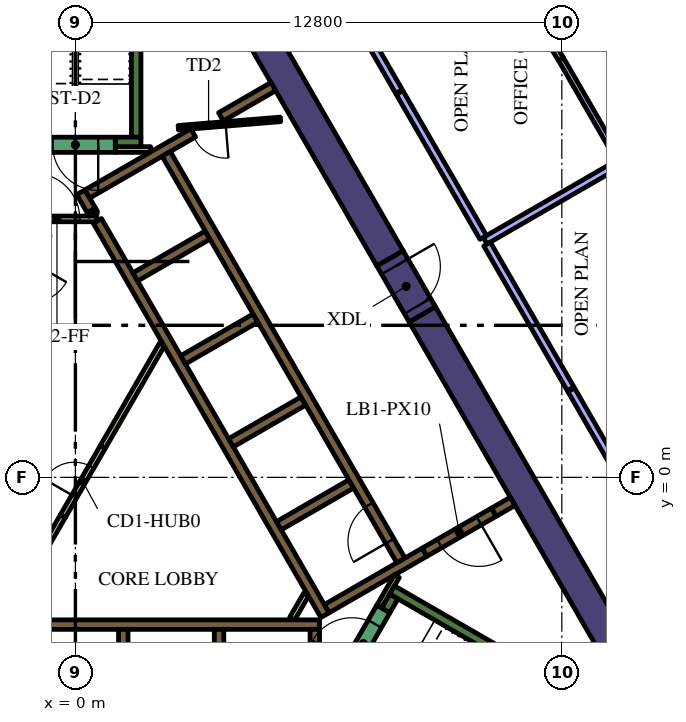
"""IFC4 building model, lengths in metres.
Left out: names, types, materials, properties, quantities, classifications, styles, units other than length and angle.
Written with IfcOpenShell. Run it as: python <this file> out.ifc"""

import sys

from ifc_helpers import new_model, si_unit, direction, frame, frame_2d, origin, place, context, subcontext, project, spatial, rectangle, extrude, element, fill, save


model = new_model("IFC4")
c1 = context("Model", 3, precision=1e-05, world=origin(), true_north=direction((0.0, 1.0)))
c2 = subcontext(c1, "Body", "Model", "MODEL_VIEW")
j1 = project(units=[si_unit("LENGTHUNIT", "METRE"), si_unit("PLANEANGLEUNIT", "RADIAN")], contexts=[c1])
p1 = place(None, origin())
s1 = spatial("IfcSite", under=j1, at=p1, CompositionType="ELEMENT")
p2 = place(p1, origin())
s2 = spatial("IfcBuilding", under=s1, at=p2, CompositionType="ELEMENT")
p3 = place(p2, frame((0.0, 0.0, 154.2)))
s3 = spatial("IfcBuildingStorey", under=s2, at=p3, CompositionType="ELEMENT", Elevation=154.2)
p4 = place(p3, frame((9.129, 4.289, 0.0), z_axis=(0.0, 0.0, 1.0), x_axis=(0.499995742806, -0.866027861663, 0.0)))
e1 = element("IfcWall", 1, at=p4, inside=s3, PredefinedType="SOLIDWALL", context=c2, shape_type="SweptSolid", body=[
    extrude(rectangle(XDim=12.527, YDim=0.8, at=frame_2d((6.264, 0.0))), origin(), (0.0, 0.0, 1.0), 4.2),
])
p5 = place(p3, frame((8.279, 5.761, 0.0), z_axis=(0.0, 0.0, 1.0), x_axis=(-0.500010359015, 0.866019422922, 0.0)))
e2 = element("IfcWall", 2, at=p5, inside=s3, PredefinedType="SOLIDWALL", context=c2, shape_type="SweptSolid", body=[
    extrude(rectangle(XDim=12.528, YDim=0.8, at=frame_2d((6.264, 0.0))), origin(), (0.0, 0.0, 1.0), 4.2),
])
p6 = place(p3, frame((8.334, -2.964, 0.0), z_axis=(0.0, 0.0, 1.0), x_axis=(0.866016039709, -0.500016218704, 0.0)))
e3 = element("IfcWall", 3, at=p6, inside=s3, PredefinedType="SOLIDWALL", context=c2, shape_type="SweptSolid", body=[
    extrude(rectangle(XDim=7.05, YDim=0.25, at=frame_2d((3.525, 0.0))), origin(), (0.0, 0.0, 1.0), 4.2),
])
p7 = place(p3, frame((8.168, -3.503, 0.0), z_axis=(0.0, 0.0, 1.0), x_axis=(0.49972245349, 0.866185586049, 0.0)))
e4 = element("IfcWall", 4, at=p7, inside=s3, PredefinedType="SOLIDWALL", context=c2, shape_type="SweptSolid", body=[
    extrude(rectangle(XDim=0.425, YDim=0.25, at=frame_2d((0.212, 0.0))), origin(), (0.0, 0.0, 1.0), 4.2),
])
p8 = place(p3, frame((1.6, 8.95, 0.0), z_axis=(0.0, 0.0, 1.0), x_axis=(0.0, 1.0, 0.0)))
e5 = element("IfcWall", 5, at=p8, inside=s3, PredefinedType="SOLIDWALL", context=c2, shape_type="SweptSolid", body=[
    extrude(rectangle(XDim=6.8, YDim=0.25, at=frame_2d((3.4, 0.0))), origin(), (0.0, 0.0, 1.0), 4.2),
])
p9 = place(p3, frame((1.05, 8.825, 0.0), z_axis=(0.0, 0.0, 1.0), x_axis=(1.0, 0.0, 0.0)))
e6 = element("IfcWall", 6, at=p9, inside=s3, PredefinedType="SOLIDWALL", context=c2, shape_type="SweptSolid", body=[
    extrude(rectangle(XDim=0.675, YDim=0.25, at=frame_2d((0.337, 0.0))), origin(), (0.0, 0.0, 1.0), 4.2),
])
p10 = place(p3, frame((-5.545, -3.875, 0.0), z_axis=(0.0, 0.0, 1.0), x_axis=(1.0, 0.0, 0.0)))
e7 = element("IfcWall", 7, at=p10, inside=s3, PredefinedType="SOLIDWALL", context=c2, shape_type="SweptSolid", body=[
    extrude(rectangle(XDim=11.97, YDim=0.25, at=frame_2d((5.985, 0.0))), origin(), (0.0, 0.0, 1.0), 4.2),
])
p11 = place(p3, frame((6.3, -7.24, 0.0), z_axis=(0.0, 0.0, 1.0), x_axis=(0.0, 1.0, 0.0)))
e8 = element("IfcWall", 8, at=p11, inside=s3, PredefinedType="SOLIDWALL", context=c2, shape_type="SweptSolid", body=[
    extrude(rectangle(XDim=3.24, YDim=0.25, at=frame_2d((1.62, 0.0))), origin(), (0.0, 0.0, 1.0), 4.2),
])
for number, where, z_axis, x_axis in (
    (9, (3.78, -4.0, 0.0), (0.0, 0.0, 1.0), (0.0, -1.0, 0.0)),
    (10, (1.26, -4.0, 0.0), (0.0, 0.0, 1.0), (0.0, -1.0, 0.0)),
):
    element("IfcWall", number, at=place(p3, frame(where, z_axis=z_axis, x_axis=x_axis)), inside=s3, PredefinedType="SOLIDWALL", context=c2, shape_type="SweptSolid", body=[
        extrude(rectangle(XDim=2.2, YDim=0.25, at=frame_2d((1.1, 0.0))), origin(), (0.0, 0.0, 1.0), 4.2),
    ])
p12 = place(p3, frame((11.507, -0.631, 0.0), z_axis=(0.0, 0.0, 1.0), x_axis=(-0.866093731455, -0.499881634324, 0.0)))
e11 = element("IfcWall", 11, at=p12, inside=s3, PredefinedType="SOLIDWALL", context=c2, shape_type="SweptSolid", body=[
    extrude(rectangle(XDim=0.575, YDim=0.25, at=frame_2d((0.288, 0.0))), origin(), (0.0, 0.0, 1.0), 4.2),
])
p13 = place(p3, frame((0.473, 6.93, 0.0), z_axis=(0.0, 0.0, 1.0), x_axis=(-0.49972245349, 0.866185586049, 0.0)))
e12 = element("IfcWall", 12, at=p13, inside=s3, PredefinedType="SOLIDWALL", context=c2, shape_type="SweptSolid", body=[
    extrude(rectangle(XDim=0.11, YDim=0.25, at=frame_2d((0.055, 0.0))), origin(), (0.0, 0.0, 1.0), 4.2),
])
p14 = place(p3, frame((6.568, -3.627, 0.0), z_axis=(0.0, 0.0, 1.0), x_axis=(-0.499999455981, 0.866025717874, 0.0)))
e13 = element("IfcWall", 13, at=p14, inside=s3, PredefinedType="SOLIDWALL", context=c2, shape_type="SweptSolid", body=[
    extrude(rectangle(XDim=11.978, YDim=0.25, at=frame_2d((5.989, 0.0))), origin(), (0.0, 0.0, 1.0), 4.2),
])
p15 = place(p3, frame((0.417, 7.027, 0.0), z_axis=(0.0, 0.0, 1.0), x_axis=(-0.500210807569, 0.865903659763, 0.0)))
e14 = element("IfcWall", 14, at=p15, inside=s3, PredefinedType="SOLIDWALL", context=c2, shape_type="SweptSolid", body=[
    extrude(rectangle(XDim=0.548, YDim=0.25, at=frame_2d((0.274, 0.0))), origin(), (0.0, 0.0, 1.0), 4.2),
])
p16 = place(p3, frame((3.1, 9.064, 0.0), z_axis=(0.0, 0.0, 1.0), x_axis=(-0.866030133475, -0.499991807846, 0.0)))
e15 = element("IfcWall", 15, at=p16, inside=s3, PredefinedType="SOLIDWALL", context=c2, shape_type="SweptSolid", body=[
    extrude(rectangle(XDim=3.217, YDim=0.25, at=frame_2d((1.608, 0.0))), origin(), (0.0, 0.0, 1.0), 4.2),
])
p17 = place(p3, frame((1.574, 5.274, 0.0), z_axis=(0.0, 0.0, 1.0), x_axis=(0.866028486751, 0.499994660107, 0.0)))
e16 = element("IfcWall", 16, at=p17, inside=s3, PredefinedType="SOLIDWALL", context=c2, shape_type="SweptSolid", body=[
    extrude(rectangle(XDim=2.2, YDim=0.25, at=frame_2d((1.1, 0.0))), origin(), (0.0, 0.0, 1.0), 4.2),
])
for number, where, z_axis, x_axis in (
    (17, (2.834, 3.091, 0.0), (0.0, 0.0, 1.0), (0.866, 0.5, 0.0)),
    (18, (4.094, 0.909, 0.0), (0.0, 0.0, 1.0), (0.866, 0.5, 0.0)),
    (19, (5.354, -1.274, 0.0), (0.0, 0.0, 1.0), (0.866, 0.5, 0.0)),
):
    element("IfcWall", number, at=place(p3, frame(where, z_axis=z_axis, x_axis=x_axis)), inside=s3, PredefinedType="SOLIDWALL", context=c2, shape_type="SweptSolid", body=[
        extrude(rectangle(XDim=2.2, YDim=0.25, at=frame_2d((1.1, 0.0))), origin(), (0.0, 0.0, 1.0), 4.2),
    ])
p18 = place(p3, frame((6.614, -3.456, 0.0), z_axis=(0.0, 0.0, 1.0), x_axis=(0.866032512851, 0.499987686533, 0.0)))
e20 = element("IfcWall", 20, at=p18, inside=s3, PredefinedType="SOLIDWALL", context=c2, shape_type="SweptSolid", body=[
    extrude(rectangle(XDim=2.975, YDim=0.25, at=frame_2d((1.487, 0.0))), origin(), (0.0, 0.0, 1.0), 4.2),
])
p19 = place(p3, frame((3.83, 9.486, 0.0), z_axis=(0.0, 0.0, 1.0), x_axis=(0.865986202621, 0.500067892261, 0.0)))
e21 = element("IfcWall", 21, at=p19, inside=s3, PredefinedType="SOLIDWALL", context=c2, shape_type="SweptSolid", body=[
    extrude(rectangle(XDim=1.591, YDim=0.25, at=frame_2d((0.795, 0.0))), origin(), (0.0, 0.0, 1.0), 4.2),
])
p20 = place(p3, frame((1.05, 8.625, 0.0), z_axis=(0.0, 0.0, 1.0), x_axis=(1.0, 0.0, 0.0)))
e22 = element("IfcWall", 22, at=p20, inside=s3, PredefinedType="PARTITIONING", context=c2, shape_type="SweptSolid", body=[
    extrude(rectangle(XDim=0.929, YDim=0.15, at=frame_2d((0.464, 0.0))), origin(), (0.0, 0.0, 1.0), 3.15),
])
p21 = place(p3, frame((8.459, -2.599, 0.0), z_axis=(0.0, 0.0, 1.0), x_axis=(-0.500041054325, -0.866001699761, 0.0)))
e23 = element("IfcWall", 23, at=p21, inside=s3, PredefinedType="PARTITIONING", context=c2, shape_type="SweptSolid", body=[
    extrude(rectangle(XDim=0.929, YDim=0.15, at=frame_2d((0.464, 0.0))), origin(), (0.0, 0.0, 1.0), 4.2),
])
p22 = place(p3, frame((5.705, -3.718, 0.0), z_axis=(0.0, 0.0, 1.0), x_axis=(0.499962090823, 0.866047289552, 0.0)))
e24 = element("IfcWall", 24, at=p22, inside=s3, PredefinedType="PARTITIONING", context=c2, shape_type="SweptSolid", body=[
    extrude(rectangle(XDim=0.735, YDim=0.15, at=frame_2d((0.367, 0.0))), origin(), (0.0, 0.0, 1.0), 3.15),
])
p23 = place(p3, frame((-1.887, -3.718, 0.0), z_axis=(0.0, 0.0, 1.0), x_axis=(0.500043732237, 0.866000153493, 0.0)))
e25 = element("IfcWall", 25, at=p23, inside=s3, PredefinedType="PARTITIONING", context=c2, shape_type="SweptSolid", body=[
    extrude(rectangle(XDim=3.114, YDim=0.15, at=frame_2d((1.557, 0.0))), origin(), (0.0, 0.0, 1.0), 3.15),
])
p24 = place(p3, frame((0.72, 0.797, 0.0), z_axis=(0.0, 0.0, 1.0), x_axis=(0.499984921984, 0.866034108906, 0.0)))
e26 = element("IfcWall", 26, at=p24, inside=s3, PredefinedType="PARTITIONING", context=c2, shape_type="SweptSolid", body=[
    extrude(rectangle(XDim=3.113, YDim=0.15, at=frame_2d((1.557, 0.0))), origin(), (0.0, 0.0, 1.0), 3.15),
])
p25 = place(p3, frame((8.565, -2.185, 0.0), z_axis=(0.0, 0.0, 1.0), x_axis=(-0.499997954832, 0.866026584559, 0.0)))
e27 = element("IfcWall", 27, at=p25, inside=s3, PredefinedType="SOLIDWALL", context=c2, shape_type="SweptSolid", body=[
    extrude(rectangle(XDim=12.35, YDim=0.25, at=frame_2d((6.175, 0.0))), origin(), (0.0, 0.0, 1.0), 4.2),
])
p26 = place(p25, frame((0.585, 0.0, 0.0)))
e28 = element("IfcOpeningElement", 28, at=p26, cuts=e27, PredefinedType="OPENING", context=c2, shape_type="SweptSolid", body=[
    extrude(rectangle(XDim=1.1, YDim=2.1, at=frame_2d((0.55, 1.05))), frame((0.0, 0.135, 0.0), z_axis=(0.0, -1.0, 0.0), x_axis=(1.0, 0.0, 0.0)), (0.0, 0.0, 1.0), 0.27),
])
p27 = place(p3, frame((7.053, -5.284, 0.0), z_axis=(0.0, 0.0, 1.0), x_axis=(0.500078061341, 0.865980330357, 0.0)))
e29 = element("IfcWall", 29, at=p27, inside=s3, PredefinedType="SOLIDWALL", context=c2, shape_type="SweptSolid", body=[
    extrude(rectangle(XDim=2.1, YDim=0.4, at=frame_2d((1.05, 0.0))), origin(), (0.0, 0.0, 1.0), 4.2),
])
p28 = place(p27, frame((0.45, 0.0, 0.0)))
e30 = element("IfcOpeningElement", 30, at=p28, cuts=e29, PredefinedType="OPENING", context=c2, shape_type="SweptSolid", body=[
    extrude(rectangle(XDim=1.2, YDim=2.1, at=frame_2d((0.6, 1.05))), frame((0.0, 0.21, 0.0), z_axis=(0.0, -1.0, 0.0), x_axis=(1.0, 0.0, 0.0)), (0.0, 0.0, 1.0), 0.42),
])
p29 = place(p3, frame((1.05, 8.75, 0.0), z_axis=(0.0, 0.0, 1.0), x_axis=(-1.0, 0.0, 0.0)))
e31 = element("IfcWall", 31, at=p29, inside=s3, PredefinedType="SOLIDWALL", context=c2, shape_type="SweptSolid", body=[
    extrude(rectangle(XDim=2.1, YDim=0.4, at=frame_2d((1.05, 0.0))), origin(), (0.0, 0.0, 1.0), 4.2),
])
p30 = place(p29, frame((0.45, 0.0, 0.0)))
e32 = element("IfcOpeningElement", 32, at=p30, cuts=e31, PredefinedType="OPENING", context=c2, shape_type="SweptSolid", body=[
    extrude(rectangle(XDim=1.2, YDim=2.1, at=frame_2d((0.6, 1.05))), frame((0.0, 0.21, 0.0), z_axis=(0.0, -1.0, 0.0), x_axis=(1.0, 0.0, 0.0)), (0.0, 0.0, 1.0), 0.42),
])
p31 = place(p3, frame((5.398, 9.419, 0.0), z_axis=(0.0, 0.0, 1.0), x_axis=(-0.996653416376, -0.081743303248, 0.0)))
e33 = element("IfcWall", 33, at=p31, inside=s3, PredefinedType="PARTITIONING", context=c2, shape_type="SweptSolid", body=[
    extrude(rectangle(XDim=2.7, YDim=0.12, at=frame_2d((1.35, 0.0))), origin(), (0.0, 0.0, 1.0), 3.15),
])
p32 = place(p31, frame((1.45, 0.0, 0.0)))
e34 = element("IfcOpeningElement", 34, at=p32, cuts=e33, PredefinedType="OPENING", context=c2, shape_type="SweptSolid", body=[
    extrude(rectangle(XDim=0.9, YDim=2.1, at=frame_2d((0.45, 1.05))), frame((0.0, 0.07, 0.0), z_axis=(0.0, -1.0, 0.0), x_axis=(1.0, 0.0, 0.0)), (0.0, 0.0, 1.0), 0.14),
])
p33 = place(p3, frame((-0.33, -1.022, 0.0), z_axis=(0.0, 0.0, 1.0), x_axis=(0.500027713859, 0.866009402589, 0.0)))
e35 = element("IfcWall", 35, at=p33, inside=s3, PredefinedType="PARTITIONING", context=c2, shape_type="SweptSolid", body=[
    extrude(rectangle(XDim=2.1, YDim=0.15, at=frame_2d((1.05, 0.0))), origin(), (0.0, 0.0, 1.0), 3.15),
])
p34 = place(p33, frame((0.6, 0.0, 0.0)))
e36 = element("IfcOpeningElement", 36, at=p34, cuts=e35, PredefinedType="OPENING", context=c2, shape_type="SweptSolid", body=[
    extrude(rectangle(XDim=0.9, YDim=2.1, at=frame_2d((0.45, 1.05))), frame((0.0, 0.085, 0.0), z_axis=(0.0, -1.0, 0.0), x_axis=(1.0, 0.0, 0.0)), (0.0, 0.0, 1.0), 0.17),
])
p35 = place(p3, frame((-1.534, 6.8, 0.0), z_axis=(0.0, 0.0, 1.0), x_axis=(1.0, 0.0, 0.0)))
e37 = element("IfcWall", 37, at=p35, inside=s3, PredefinedType="PARTITIONING", context=c2, shape_type="SweptSolid", body=[
    extrude(rectangle(XDim=2.1, YDim=0.15, at=frame_2d((1.05, 0.0))), origin(), (0.0, 0.0, 1.0), 3.15),
])
p36 = place(p35, frame((0.45, 0.0, 0.0)))
e38 = element("IfcOpeningElement", 38, at=p36, cuts=e37, PredefinedType="OPENING", context=c2, shape_type="SweptSolid", body=[
    extrude(rectangle(XDim=1.2, YDim=2.1, at=frame_2d((0.6, 1.05))), frame((0.0, 0.085, 0.0), z_axis=(0.0, -1.0, 0.0), x_axis=(1.0, 0.0, 0.0)), (0.0, 0.0, 1.0), 0.17),
])
p37 = place(p3, frame((11.009, -0.919, 0.0), z_axis=(0.0, 0.0, 1.0), x_axis=(-0.866059744384, -0.49994051562, 0.0)))
e39 = element("IfcWall", 39, at=p37, inside=s3, PredefinedType="SOLIDWALL", context=c2, shape_type="SweptSolid", body=[
    extrude(rectangle(XDim=2.1, YDim=0.25, at=frame_2d((1.05, 0.0))), origin(), (0.0, 0.0, 1.0), 4.2),
])
p38 = place(p37, frame((0.45, 0.0, 0.0)))
e40 = element("IfcOpeningElement", 40, at=p38, cuts=e39, PredefinedType="OPENING", context=c2, shape_type="SweptSolid", body=[
    extrude(rectangle(XDim=1.2, YDim=2.1, at=frame_2d((0.6, 1.05))), frame((0.0, 0.135, 0.0), z_axis=(0.0, -1.0, 0.0), x_axis=(1.0, 0.0, 0.0)), (0.0, 0.0, 1.0), 0.27),
])
p39 = place(p3, frame((8.279, 5.761, 0.0), z_axis=(0.0, 0.0, 1.0), x_axis=(0.500062241894, -0.865989465428, 0.0)))
e41 = element("IfcWall", 41, at=p39, inside=s3, PredefinedType="SOLIDWALL", context=c2, shape_type="SweptSolid", body=[
    extrude(rectangle(XDim=1.7, YDim=0.8, at=frame_2d((0.85, 0.0))), origin(), (0.0, 0.0, 1.0), 4.2),
])
p40 = place(p39, frame((0.25, 0.0, 0.0)))
e42 = element("IfcOpeningElement", 42, at=p40, cuts=e41, PredefinedType="OPENING", context=c2, shape_type="SweptSolid", body=[
    extrude(rectangle(XDim=1.2, YDim=2.1, at=frame_2d((0.6, 1.05))), frame((0.0, 0.41, 0.0), z_axis=(0.0, -1.0, 0.0), x_axis=(1.0, 0.0, 0.0)), (0.0, 0.0, 1.0), 0.82),
])
p41 = place(p3, frame((10.782, 6.225, 0.0), z_axis=(0.0, 0.0, 1.0), x_axis=(0.866034752867, 0.499983806564, 0.0)))
e43 = element("IfcWall", 43, at=p41, inside=s3, PredefinedType="PARTITIONING", context=c2, shape_type="SweptSolid", body=[
    extrude(rectangle(XDim=4.043, YDim=0.2, at=frame_2d((2.021, 0.0))), origin(), (0.0, 0.0, 1.0), 3.15),
])
p42 = place(p3, frame((13.032, 2.328, 0.0), z_axis=(0.0, 0.0, 1.0), x_axis=(-0.499988222896, 0.866032203192, 0.0)))
e44 = element("IfcWall", 44, at=p42, inside=s3, PredefinedType="PARTITIONING", context=c2, shape_type="SweptSolid", body=[
    extrude(rectangle(XDim=4.4, YDim=0.2, at=frame_2d((2.2, 0.0))), origin(), (0.0, 0.0, 1.0), 3.15),
])
p43 = place(p3, frame((18.042, -6.35, 0.0), z_axis=(0.0, 0.0, 1.0), x_axis=(-0.499986873641, 0.866032982159, 0.0)))
e45 = element("IfcWall", 45, at=p43, inside=s3, PredefinedType="PARTITIONING", context=c2, shape_type="SweptSolid", body=[
    extrude(rectangle(XDim=9.99, YDim=0.2, at=frame_2d((4.995, 0.0))), origin(), (0.0, 0.0, 1.0), 3.15),
])
p44 = place(p43, frame((4.5, 0.0, 0.0)))
e46 = element("IfcOpeningElement", 46, at=p44, cuts=e45, PredefinedType="OPENING", context=c2, shape_type="SweptSolid", body=[
    extrude(rectangle(XDim=1.0, YDim=2.1, at=frame_2d((0.5, 1.05))), frame((0.0, 0.11, 0.0), z_axis=(0.0, -1.0, 0.0), x_axis=(1.0, 0.0, 0.0)), (0.0, 0.0, 1.0), 0.22),
])
p45 = place(p3, frame((14.299, 8.371, 0.0), z_axis=(0.0, 0.0, 1.0), x_axis=(-0.500019211527, 0.86601431172, 0.0)))
e47 = element("IfcWall", 47, at=p45, inside=s3, PredefinedType="PARTITIONING", context=c2, shape_type="SweptSolid", body=[
    extrude(rectangle(XDim=3.039, YDim=0.15, at=frame_2d((1.519, 0.0))), origin(), (0.0, 0.0, 1.0), 3.15),
])
p46 = place(p3, frame((9.403, 16.447, 0.0), z_axis=(0.0, 0.0, 1.0), x_axis=(0.527026092571, -0.849849102929, 0.0)))
e48 = element("IfcWall", 48, at=p46, inside=s3, PredefinedType="PARTITIONING", context=c2, shape_type="SweptSolid", body=[
    extrude(rectangle(XDim=6.407, YDim=0.15, at=frame_2d((3.204, 0.0))), origin(), (0.0, 0.0, 1.0), 3.15),
])
p47 = place(p46, frame((2.707, 0.0, 0.0)))
e49 = element("IfcOpeningElement", 49, at=p47, cuts=e48, PredefinedType="OPENING", context=c2, shape_type="SweptSolid", body=[
    extrude(rectangle(XDim=0.9, YDim=2.1, at=frame_2d((0.45, 1.05))), frame((0.0, 0.085, 0.0), z_axis=(0.0, -1.0, 0.0), x_axis=(1.0, 0.0, 0.0)), (0.0, 0.0, 1.0), 0.17),
])
p48 = place(p3, frame((10.732, 6.312, 0.0), z_axis=(0.0, 0.0, 1.0), x_axis=(-0.499984786451, 0.866034187153, 0.0)))
e50 = element("IfcWall", 50, at=p48, inside=s3, PredefinedType="PARTITIONING", context=c2, shape_type="SweptSolid", body=[
    extrude(rectangle(XDim=4.404, YDim=0.2, at=frame_2d((2.202, 0.0))), origin(), (0.0, 0.0, 1.0), 3.15),
])
p49 = place(p3, frame((8.515, 10.152, 0.0), z_axis=(0.0, 0.0, 1.0), x_axis=(-0.499998974385, 0.866025995923, 0.0)))
e51 = element("IfcWall", 51, at=p49, inside=s3, PredefinedType="PARTITIONING", context=c2, shape_type="SweptSolid", body=[
    extrude(rectangle(XDim=9.986, YDim=0.2, at=frame_2d((4.993, 0.0))), origin(), (0.0, 0.0, 1.0), 3.15),
])
p50 = place(p49, frame((4.5, 0.0, 0.0)))
e52 = element("IfcOpeningElement", 52, at=p50, cuts=e51, PredefinedType="OPENING", context=c2, shape_type="SweptSolid", body=[
    extrude(rectangle(XDim=1.0, YDim=2.1, at=frame_2d((0.5, 1.05))), frame((0.0, 0.11, 0.0), z_axis=(0.0, -1.0, 0.0), x_axis=(1.0, 0.0, 0.0)), (0.0, 0.0, 1.0), 0.22),
])
p51 = place(p26, origin())
e53 = element("IfcDoor", 53, at=p51, inside=s3, OperationType="DOUBLE_DOOR_SLIDING", PredefinedType="DOOR", context=c2, shape_type="SweptSolid", body=[
    extrude(rectangle(XDim=1.1, YDim=2.1, at=frame_2d((0.55, 1.05))), frame((0.0, 0.025, 0.0), z_axis=(0.0, -1.0, 0.0), x_axis=(1.0, 0.0, 0.0)), (0.0, 0.0, 1.0), 0.05),
])
fill(e28, e53)
p52 = place(p28, origin())
e54 = element("IfcDoor", 54, at=p52, inside=s3, OperationType="SINGLE_SWING_LEFT", PredefinedType="DOOR", context=c2, shape_type="SweptSolid", body=[
    extrude(rectangle(XDim=1.2, YDim=2.1, at=frame_2d((0.6, 1.05))), frame((0.0, 0.025, 0.0), z_axis=(0.0, -1.0, 0.0), x_axis=(1.0, 0.0, 0.0)), (0.0, 0.0, 1.0), 0.05),
])
fill(e30, e54)
p53 = place(p30, origin())
e55 = element("IfcDoor", 55, at=p53, inside=s3, OperationType="SINGLE_SWING_LEFT", PredefinedType="DOOR", context=c2, shape_type="SweptSolid", body=[
    extrude(rectangle(XDim=1.2, YDim=2.1, at=frame_2d((0.6, 1.05))), frame((0.0, 0.025, 0.0), z_axis=(0.0, -1.0, 0.0), x_axis=(1.0, 0.0, 0.0)), (0.0, 0.0, 1.0), 0.05),
])
fill(e32, e55)
p54 = place(p32, origin())
e56 = element("IfcDoor", 56, at=p54, inside=s3, OperationType="SINGLE_SWING_LEFT", PredefinedType="DOOR", context=c2, shape_type="SweptSolid", body=[
    extrude(rectangle(XDim=0.9, YDim=2.1, at=frame_2d((0.45, 1.05))), frame((0.0, 0.025, 0.0), z_axis=(0.0, -1.0, 0.0), x_axis=(1.0, 0.0, 0.0)), (0.0, 0.0, 1.0), 0.05),
])
fill(e34, e56)
p55 = place(p34, origin())
e57 = element("IfcDoor", 57, at=p55, inside=s3, OperationType="SINGLE_SWING_LEFT", PredefinedType="DOOR", context=c2, shape_type="SweptSolid", body=[
    extrude(rectangle(XDim=0.9, YDim=2.1, at=frame_2d((0.45, 1.05))), frame((0.0, 0.025, 0.0), z_axis=(0.0, -1.0, 0.0), x_axis=(1.0, 0.0, 0.0)), (0.0, 0.0, 1.0), 0.05),
])
fill(e36, e57)
p56 = place(p36, origin())
e58 = element("IfcDoor", 58, at=p56, inside=s3, OperationType="SINGLE_SWING_LEFT", PredefinedType="DOOR", context=c2, shape_type="SweptSolid", body=[
    extrude(rectangle(XDim=1.2, YDim=2.1, at=frame_2d((0.6, 1.05))), frame((0.0, 0.025, 0.0), z_axis=(0.0, -1.0, 0.0), x_axis=(1.0, 0.0, 0.0)), (0.0, 0.0, 1.0), 0.05),
])
fill(e38, e58)
p57 = place(p38, origin())
e59 = element("IfcDoor", 59, at=p57, inside=s3, OperationType="SINGLE_SWING_LEFT", PredefinedType="DOOR", context=c2, shape_type="SweptSolid", body=[
    extrude(rectangle(XDim=1.2, YDim=2.1, at=frame_2d((0.6, 1.05))), frame((0.0, 0.025, 0.0), z_axis=(0.0, -1.0, 0.0), x_axis=(1.0, 0.0, 0.0)), (0.0, 0.0, 1.0), 0.05),
])
fill(e40, e59)
p58 = place(p40, origin())
e60 = element("IfcDoor", 60, at=p58, inside=s3, OperationType="SINGLE_SWING_LEFT", PredefinedType="DOOR", context=c2, shape_type="SweptSolid", body=[
    extrude(rectangle(XDim=1.2, YDim=2.1, at=frame_2d((0.6, 1.05))), frame((0.0, 0.025, 0.0), z_axis=(0.0, -1.0, 0.0), x_axis=(1.0, 0.0, 0.0)), (0.0, 0.0, 1.0), 0.05),
])
fill(e42, e60)
save(model, sys.argv[1])
